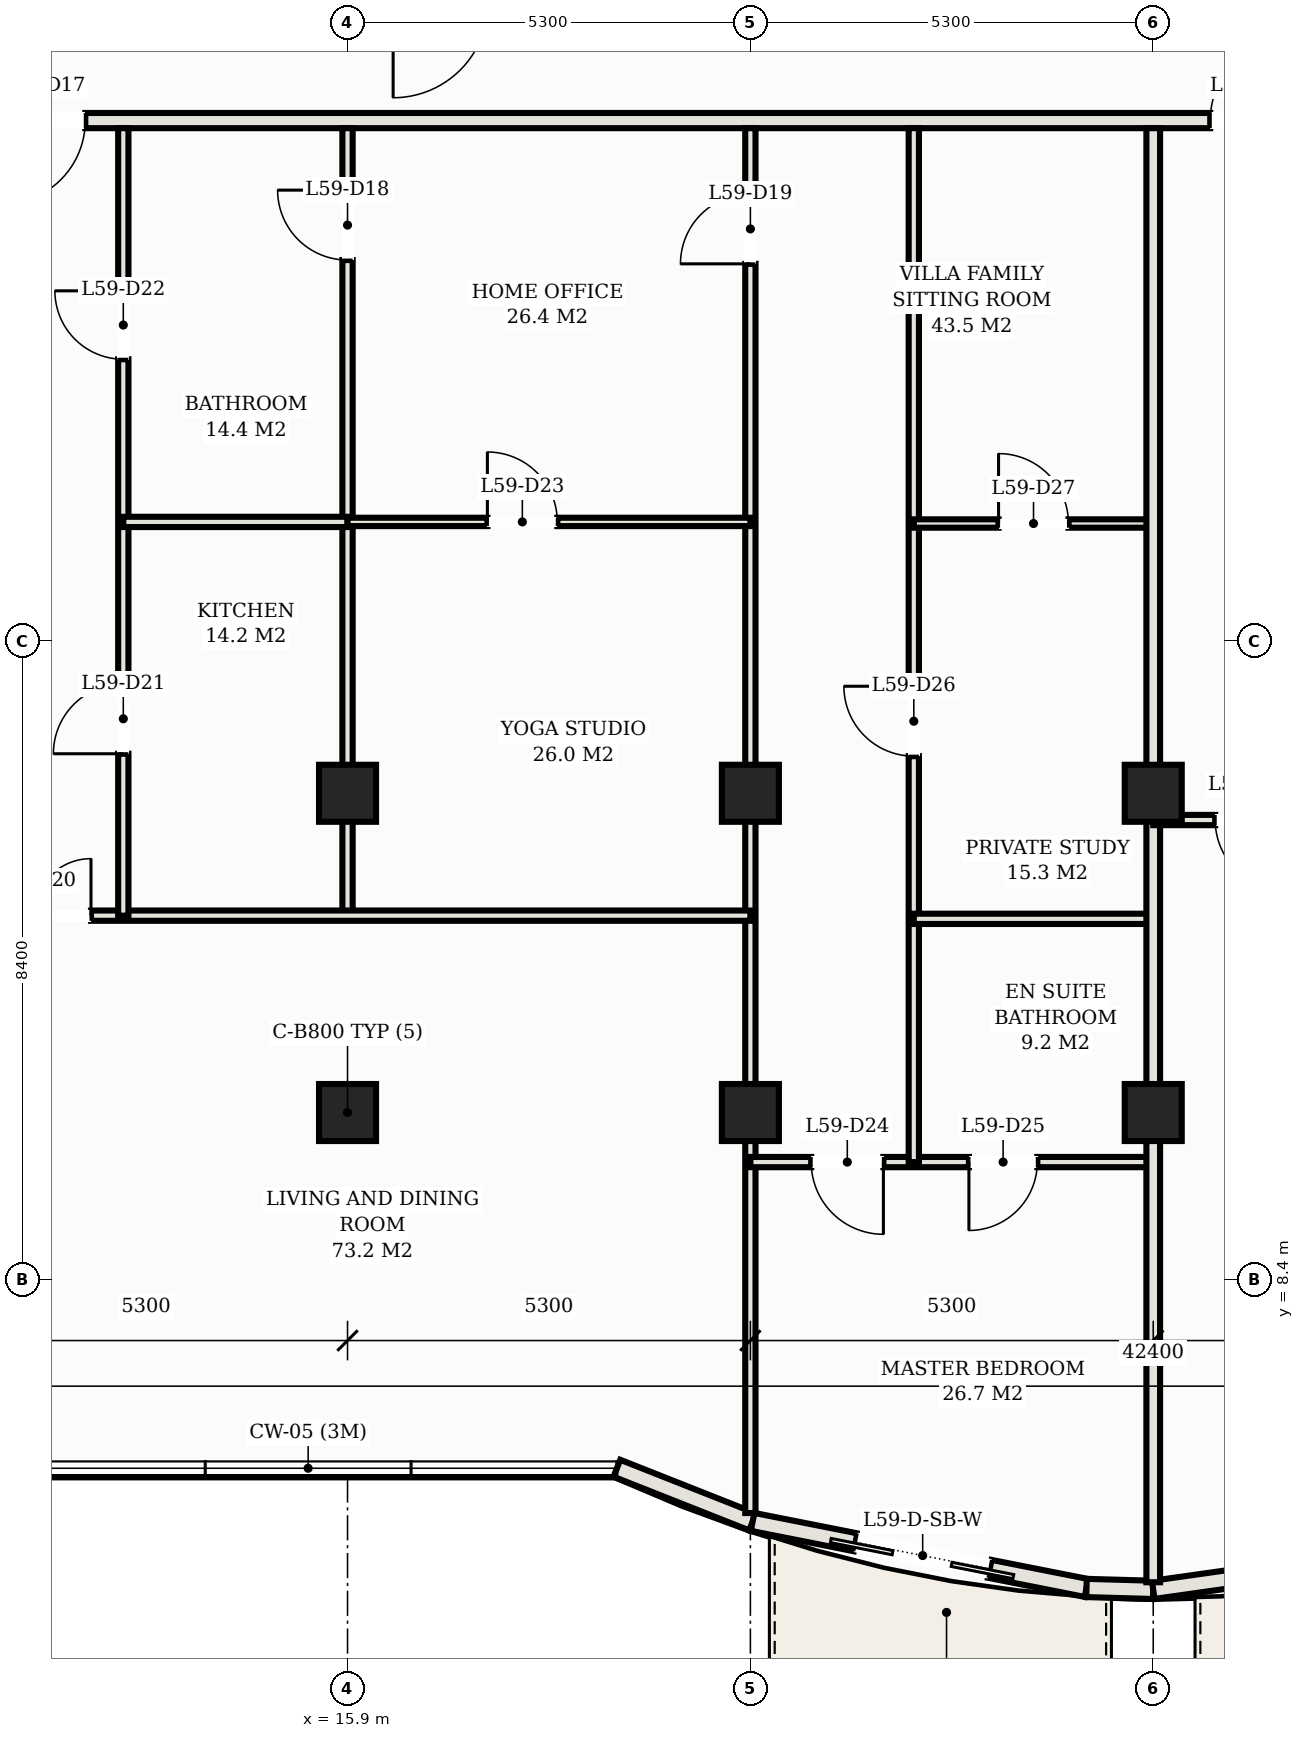
"""IFC4 building model, lengths in metres.
Left out: names, types, materials, properties, quantities, classifications, styles, units other than length and angle.
Written with IfcOpenShell. Run it as: python <this file> out.ifc"""

import sys

from ifc_helpers import new_model, si_unit, direction, frame, frame_2d, origin, origin_2d, place, context, subcontext, project, spatial, rectangle, hollow_rectangle, extrude, element, fill, save


model = new_model("IFC4")
c1 = context("Model", 3, precision=1e-05, world=origin(), true_north=direction((0.0, 1.0)))
c2 = subcontext(c1, "Body", "Model", "MODEL_VIEW")
j1 = project(units=[si_unit("LENGTHUNIT", "METRE"), si_unit("PLANEANGLEUNIT", "RADIAN")], contexts=[c1])
p1 = place(None, origin())
s1 = spatial("IfcSite", under=j1, at=p1, CompositionType="ELEMENT")
p2 = place(p1, origin())
s2 = spatial("IfcBuilding", under=s1, at=p2, CompositionType="ELEMENT")
p3 = place(p2, frame((0.0, 0.0, 216.5)))
s3 = spatial("IfcBuildingStorey", under=s2, at=p3, CompositionType="ELEMENT", Elevation=216.5)
for number, where, z_axis, x_axis in (
    (1, (15.9, 14.8, 0.0), (0.0, 0.0, 1.0), (1.0, 0.0, 0.0)),
    (2, (15.9, 10.6, 0.0), (0.0, 0.0, 1.0), (1.0, 0.0, 0.0)),
    (3, (21.2, 14.8, 0.0), (0.0, 0.0, 1.0), (1.0, 0.0, 0.0)),
    (4, (21.2, 10.6, 0.0), (0.0, 0.0, 1.0), (1.0, 0.0, 0.0)),
    (5, (26.5, 14.8, 0.0), (0.0, 0.0, 1.0), (1.0, 0.0, 0.0)),
    (6, (26.5, 10.6, 0.0), (0.0, 0.0, 1.0), (1.0, 0.0, 0.0)),
):
    element("IfcColumn", number, at=place(p3, frame(where, z_axis=z_axis, x_axis=x_axis)), inside=s3, PredefinedType="COLUMN", context=c2, shape_type="SweptSolid", body=[
        extrude(hollow_rectangle(XDim=0.75, YDim=0.75, WallThickness=0.025, at=origin_2d()), origin(), (0.0, 0.0, 1.0), 3.3),
    ])
p4 = place(p3, frame((19.444, 5.92, 0.0), z_axis=(0.0, 0.0, 1.0), x_axis=(0.92993442177, -0.367725401906, 0.0)))
e7 = element("IfcWall", 7, at=p4, inside=s3, PredefinedType="SOLIDWALL", context=c2, shape_type="SweptSolid", body=[
    extrude(rectangle(XDim=1.919, YDim=0.24, at=frame_2d((0.96, 0.0))), origin(), (0.0, 0.0, 1.0), 3.11),
])
p5 = place(p3, frame((21.229, 5.214, 0.0), z_axis=(0.0, 0.0, 1.0), x_axis=(0.980985349685, -0.194081796425, 0.0)))
e8 = element("IfcWall", 8, at=p5, inside=s3, PredefinedType="SOLIDWALL", context=c2, shape_type="SweptSolid", body=[
    extrude(rectangle(XDim=4.478, YDim=0.24, at=frame_2d((2.239, 0.0))), origin(), (0.0, 0.0, 1.0), 3.11),
])
p6 = place(p5, frame((1.381, 0.0, 0.0)))
e9 = element("IfcOpeningElement", 9, at=p6, cuts=e8, PredefinedType="OPENING", context=c2, shape_type="SweptSolid", body=[
    extrude(rectangle(XDim=1.8, YDim=2.2, at=frame_2d((0.9, 1.1))), frame((0.0, 0.13, 0.0), z_axis=(0.0, -1.0, 0.0), x_axis=(1.0, 0.0, 0.0)), (0.0, 0.0, 1.0), 0.26),
])
p7 = place(p3, frame((25.622, 4.345, 0.0), z_axis=(0.0, 0.0, 1.0), x_axis=(0.999597960231, -0.028353446035, 0.0)))
e10 = element("IfcWall", 10, at=p7, inside=s3, PredefinedType="SOLIDWALL", context=c2, shape_type="SweptSolid", body=[
    extrude(rectangle(XDim=0.878, YDim=0.24, at=frame_2d((0.439, 0.0))), origin(), (0.0, 0.0, 1.0), 3.11),
])
p8 = place(p3, frame((26.5, 4.32, 0.0), z_axis=(0.0, 0.0, 1.0), x_axis=(0.990156470874, 0.139964864115, 0.0)))
e11 = element("IfcWall", 11, at=p8, inside=s3, PredefinedType="SOLIDWALL", context=c2, shape_type="SweptSolid", body=[
    extrude(rectangle(XDim=4.436, YDim=0.24, at=frame_2d((2.218, 0.0))), origin(), (0.0, 0.0, 1.0), 3.11),
])
p9 = place(p8, frame((1.318, 0.0, 0.0)))
e12 = element("IfcOpeningElement", 12, at=p9, cuts=e11, PredefinedType="OPENING", context=c2, shape_type="SweptSolid", body=[
    extrude(rectangle(XDim=1.8, YDim=2.2, at=frame_2d((0.9, 1.1))), frame((0.0, 0.13, 0.0), z_axis=(0.0, -1.0, 0.0), x_axis=(1.0, 0.0, 0.0)), (0.0, 0.0, 1.0), 0.26),
])
p10 = place(p3, frame((6.72, 23.65, 0.0), z_axis=(0.0, 0.0, 1.0), x_axis=(1.0, 0.0, 0.0)))
e13 = element("IfcWall", 13, at=p10, inside=s3, PredefinedType="PARTITIONING", context=c2, shape_type="SweptSolid", body=[
    extrude(rectangle(XDim=39.56, YDim=0.2, at=frame_2d((19.78, 0.0))), origin(), (0.0, 0.0, 1.0), 2.43),
])
p11 = place(p10, frame((4.63, 0.0, 0.0)))
e14 = element("IfcOpeningElement", 14, at=p11, cuts=e13, PredefinedType="OPENING", context=c2, shape_type="SweptSolid", body=[
    extrude(rectangle(XDim=1.1, YDim=2.25, at=frame_2d((0.55, 1.125))), frame((0.0, 0.11, 0.0), z_axis=(0.0, -1.0, 0.0), x_axis=(1.0, 0.0, 0.0)), (0.0, 0.0, 1.0), 0.22),
])
p12 = place(p10, frame((20.53, 0.0, 0.0)))
e15 = element("IfcOpeningElement", 15, at=p12, cuts=e13, PredefinedType="OPENING", context=c2, shape_type="SweptSolid", body=[
    extrude(rectangle(XDim=1.1, YDim=2.25, at=frame_2d((0.55, 1.125))), frame((0.0, 0.11, 0.0), z_axis=(0.0, -1.0, 0.0), x_axis=(1.0, 0.0, 0.0)), (0.0, 0.0, 1.0), 0.22),
])
p13 = place(p10, frame((2.085, 0.0, 0.0)))
e16 = element("IfcOpeningElement", 16, at=p13, cuts=e13, PredefinedType="OPENING", context=c2, shape_type="SweptSolid", body=[
    extrude(rectangle(XDim=0.92, YDim=2.15, at=frame_2d((0.46, 1.075))), frame((0.0, 0.11, 0.0), z_axis=(0.0, -1.0, 0.0), x_axis=(1.0, 0.0, 0.0)), (0.0, 0.0, 1.0), 0.22),
])
p14 = place(p10, frame((36.555, 0.0, 0.0)))
e17 = element("IfcOpeningElement", 17, at=p14, cuts=e13, PredefinedType="OPENING", context=c2, shape_type="SweptSolid", body=[
    extrude(rectangle(XDim=0.92, YDim=2.15, at=frame_2d((0.46, 1.075))), frame((0.0, 0.11, 0.0), z_axis=(0.0, -1.0, 0.0), x_axis=(1.0, 0.0, 0.0)), (0.0, 0.0, 1.0), 0.22),
])
p15 = place(p3, frame((15.9, 14.8, 0.0), z_axis=(0.0, 0.0, 1.0), x_axis=(0.0, 1.0, 0.0)))
e18 = element("IfcWall", 18, at=p15, inside=s3, PredefinedType="PARTITIONING", context=c2, shape_type="SweptSolid", body=[
    extrude(rectangle(XDim=8.75, YDim=0.135, at=frame_2d((4.375, 0.0))), origin(), (0.0, 0.0, 1.0), 2.43),
])
p16 = place(p15, frame((7.015, 0.0, 0.0)))
e19 = element("IfcOpeningElement", 19, at=p16, cuts=e18, PredefinedType="OPENING", context=c2, shape_type="SweptSolid", body=[
    extrude(rectangle(XDim=0.92, YDim=2.15, at=frame_2d((0.46, 1.075))), frame((0.0, 0.078, 0.0), z_axis=(0.0, -1.0, 0.0), x_axis=(1.0, 0.0, 0.0)), (0.0, 0.0, 1.0), 0.155),
])
p17 = place(p3, frame((21.2, 5.331, 0.0), z_axis=(0.0, 0.0, 1.0), x_axis=(0.0, 1.0, 0.0)))
e20 = element("IfcWall", 20, at=p17, inside=s3, PredefinedType="PARTITIONING", context=c2, shape_type="SweptSolid", body=[
    extrude(rectangle(XDim=18.219, YDim=0.135, at=frame_2d((9.109, 0.0))), origin(), (0.0, 0.0, 1.0), 2.43),
])
p18 = place(p17, frame((16.434, 0.0, 0.0)))
e21 = element("IfcOpeningElement", 21, at=p18, cuts=e20, PredefinedType="OPENING", context=c2, shape_type="SweptSolid", body=[
    extrude(rectangle(XDim=0.92, YDim=2.15, at=frame_2d((0.46, 1.075))), frame((0.0, 0.078, 0.0), z_axis=(0.0, -1.0, 0.0), x_axis=(1.0, 0.0, 0.0)), (0.0, 0.0, 1.0), 0.155),
])
p19 = place(p3, frame((15.9, 13.19, 0.0), z_axis=(0.0, 0.0, 1.0), x_axis=(0.0, 1.0, 0.0)))
e22 = element("IfcWall", 22, at=p19, inside=s3, PredefinedType="PARTITIONING", context=c2, shape_type="SweptSolid", body=[
    extrude(rectangle(XDim=1.61, YDim=0.135, at=frame_2d((0.805, 0.0))), origin(), (0.0, 0.0, 1.0), 2.43),
])
p20 = place(p3, frame((10.6, 13.19, 0.0), z_axis=(0.0, 0.0, 1.0), x_axis=(1.0, 0.0, 0.0)))
e23 = element("IfcWall", 23, at=p20, inside=s3, PredefinedType="PARTITIONING", context=c2, shape_type="SweptSolid", body=[
    extrude(rectangle(XDim=10.6, YDim=0.135, at=frame_2d((5.3, 0.0))), origin(), (0.0, 0.0, 1.0), 2.43),
])
p21 = place(p20, frame((0.425, 0.0, 0.0)))
e24 = element("IfcOpeningElement", 24, at=p21, cuts=e23, PredefinedType="OPENING", context=c2, shape_type="SweptSolid", body=[
    extrude(rectangle(XDim=1.5, YDim=2.25, at=frame_2d((0.75, 1.125))), frame((0.0, 0.078, 0.0), z_axis=(0.0, -1.0, 0.0), x_axis=(1.0, 0.0, 0.0)), (0.0, 0.0, 1.0), 0.155),
])
p22 = place(p3, frame((12.95, 13.19, 0.0), z_axis=(0.0, 0.0, 1.0), x_axis=(0.0, 1.0, 0.0)))
e25 = element("IfcWall", 25, at=p22, inside=s3, PredefinedType="PARTITIONING", context=c2, shape_type="SweptSolid", body=[
    extrude(rectangle(XDim=10.36, YDim=0.135, at=frame_2d((5.18, 0.0))), origin(), (0.0, 0.0, 1.0), 2.43),
])
p23 = place(p22, frame((2.13, 0.0, 0.0)))
e26 = element("IfcOpeningElement", 26, at=p23, cuts=e25, PredefinedType="OPENING", context=c2, shape_type="SweptSolid", body=[
    extrude(rectangle(XDim=0.92, YDim=2.15, at=frame_2d((0.46, 1.075))), frame((0.0, 0.078, 0.0), z_axis=(0.0, -1.0, 0.0), x_axis=(1.0, 0.0, 0.0)), (0.0, 0.0, 1.0), 0.155),
])
p24 = place(p22, frame((7.32, 0.0, 0.0)))
e27 = element("IfcOpeningElement", 27, at=p24, cuts=e25, PredefinedType="OPENING", context=c2, shape_type="SweptSolid", body=[
    extrude(rectangle(XDim=0.9, YDim=2.15, at=frame_2d((0.45, 1.075))), frame((0.0, 0.078, 0.0), z_axis=(0.0, -1.0, 0.0), x_axis=(1.0, 0.0, 0.0)), (0.0, 0.0, 1.0), 0.155),
])
p25 = place(p3, frame((12.95, 18.37, 0.0), z_axis=(0.0, 0.0, 1.0), x_axis=(1.0, 0.0, 0.0)))
e28 = element("IfcWall", 28, at=p25, inside=s3, PredefinedType="PARTITIONING", context=c2, shape_type="SweptSolid", body=[
    extrude(rectangle(XDim=2.95, YDim=0.135, at=frame_2d((1.475, 0.0))), origin(), (0.0, 0.0, 1.0), 2.43),
])
p26 = place(p3, frame((15.9, 18.37, 0.0), z_axis=(0.0, 0.0, 1.0), x_axis=(1.0, 0.0, 0.0)))
e29 = element("IfcWall", 29, at=p26, inside=s3, PredefinedType="MOVABLE", context=c2, shape_type="SweptSolid", body=[
    extrude(rectangle(XDim=5.3, YDim=0.11, at=frame_2d((2.65, 0.0))), origin(), (0.0, 0.0, 1.0), 2.43),
])
p27 = place(p26, frame((1.84, 0.0, 0.0)))
e30 = element("IfcOpeningElement", 30, at=p27, cuts=e29, PredefinedType="OPENING", context=c2, shape_type="SweptSolid", body=[
    extrude(rectangle(XDim=0.92, YDim=2.15, at=frame_2d((0.46, 1.075))), frame((0.0, 0.065, 0.0), z_axis=(0.0, -1.0, 0.0), x_axis=(1.0, 0.0, 0.0)), (0.0, 0.0, 1.0), 0.13),
])
p28 = place(p3, frame((21.2, 9.948, 0.0), z_axis=(0.0, 0.0, 1.0), x_axis=(1.0, 0.0, 0.0)))
e31 = element("IfcWall", 31, at=p28, inside=s3, PredefinedType="PARTITIONING", context=c2, shape_type="SweptSolid", body=[
    extrude(rectangle(XDim=5.3, YDim=0.135, at=frame_2d((2.65, 0.0))), origin(), (0.0, 0.0, 1.0), 2.43),
])
p29 = place(p28, frame((0.8, 0.0, 0.0)))
e32 = element("IfcOpeningElement", 32, at=p29, cuts=e31, PredefinedType="OPENING", context=c2, shape_type="SweptSolid", body=[
    extrude(rectangle(XDim=0.95, YDim=2.15, at=frame_2d((0.475, 1.075))), frame((0.0, 0.078, 0.0), z_axis=(0.0, -1.0, 0.0), x_axis=(1.0, 0.0, 0.0)), (0.0, 0.0, 1.0), 0.155),
])
p30 = place(p28, frame((2.875, 0.0, 0.0)))
e33 = element("IfcOpeningElement", 33, at=p30, cuts=e31, PredefinedType="OPENING", context=c2, shape_type="SweptSolid", body=[
    extrude(rectangle(XDim=0.9, YDim=2.15, at=frame_2d((0.45, 1.075))), frame((0.0, 0.078, 0.0), z_axis=(0.0, -1.0, 0.0), x_axis=(1.0, 0.0, 0.0)), (0.0, 0.0, 1.0), 0.155),
])
p31 = place(p3, frame((23.35, 9.948, 0.0), z_axis=(0.0, 0.0, 1.0), x_axis=(0.0, 1.0, 0.0)))
e34 = element("IfcWall", 34, at=p31, inside=s3, PredefinedType="PARTITIONING", context=c2, shape_type="SweptSolid", body=[
    extrude(rectangle(XDim=13.602, YDim=0.135, at=frame_2d((6.801, 0.0))), origin(), (0.0, 0.0, 1.0), 2.43),
])
p32 = place(p31, frame((5.34, 0.0, 0.0)))
e35 = element("IfcOpeningElement", 35, at=p32, cuts=e34, PredefinedType="OPENING", context=c2, shape_type="SweptSolid", body=[
    extrude(rectangle(XDim=0.92, YDim=2.15, at=frame_2d((0.46, 1.075))), frame((0.0, 0.078, 0.0), z_axis=(0.0, -1.0, 0.0), x_axis=(1.0, 0.0, 0.0)), (0.0, 0.0, 1.0), 0.155),
])
p33 = place(p3, frame((23.35, 13.148, 0.0), z_axis=(0.0, 0.0, 1.0), x_axis=(1.0, 0.0, 0.0)))
e36 = element("IfcWall", 36, at=p33, inside=s3, PredefinedType="PARTITIONING", context=c2, shape_type="SweptSolid", body=[
    extrude(rectangle(XDim=3.15, YDim=0.135, at=frame_2d((1.575, 0.0))), origin(), (0.0, 0.0, 1.0), 2.43),
])
p34 = place(p3, frame((23.35, 18.349, 0.0), z_axis=(0.0, 0.0, 1.0), x_axis=(1.0, 0.0, 0.0)))
e37 = element("IfcWall", 37, at=p34, inside=s3, PredefinedType="MOVABLE", context=c2, shape_type="SweptSolid", body=[
    extrude(rectangle(XDim=3.15, YDim=0.11, at=frame_2d((1.575, 0.0))), origin(), (0.0, 0.0, 1.0), 2.43),
])
p35 = place(p34, frame((1.115, 0.0, 0.0)))
e38 = element("IfcOpeningElement", 38, at=p35, cuts=e37, PredefinedType="OPENING", context=c2, shape_type="SweptSolid", body=[
    extrude(rectangle(XDim=0.92, YDim=2.15, at=frame_2d((0.46, 1.075))), frame((0.0, 0.065, 0.0), z_axis=(0.0, -1.0, 0.0), x_axis=(1.0, 0.0, 0.0)), (0.0, 0.0, 1.0), 0.13),
])
p36 = place(p3, frame((26.5, 4.42, 0.0), z_axis=(0.0, 0.0, 1.0), x_axis=(0.0, 1.0, 0.0)))
e39 = element("IfcWall", 39, at=p36, inside=s3, PredefinedType="PARTITIONING", context=c2, shape_type="SweptSolid", body=[
    extrude(rectangle(XDim=19.13, YDim=0.18, at=frame_2d((9.565, 0.0))), origin(), (0.0, 0.0, 1.0), 2.43),
])
p37 = place(p3, frame((26.5, 14.448, 0.0), z_axis=(0.0, 0.0, 1.0), x_axis=(1.0, 0.0, 0.0)))
e40 = element("IfcWall", 40, at=p37, inside=s3, PredefinedType="PARTITIONING", context=c2, shape_type="SweptSolid", body=[
    extrude(rectangle(XDim=5.3, YDim=0.135, at=frame_2d((2.65, 0.0))), origin(), (0.0, 0.0, 1.0), 2.43),
])
p38 = place(p37, frame((0.815, 0.0, 0.0)))
e41 = element("IfcOpeningElement", 41, at=p38, cuts=e40, PredefinedType="OPENING", context=c2, shape_type="SweptSolid", body=[
    extrude(rectangle(XDim=0.92, YDim=2.15, at=frame_2d((0.46, 1.075))), frame((0.0, 0.078, 0.0), z_axis=(0.0, -1.0, 0.0), x_axis=(1.0, 0.0, 0.0)), (0.0, 0.0, 1.0), 0.155),
])
p39 = place(p6, frame((1.8, 0.0, 0.0), z_axis=(0.0, 0.0, 1.0), x_axis=(-1.0, 0.0, 0.0)))
e42 = element("IfcDoor", 42, at=p39, inside=s3, OperationType="DOUBLE_DOOR_SLIDING", PredefinedType="DOOR", context=c2, shape_type="SweptSolid", body=[
    extrude(rectangle(XDim=1.8, YDim=2.2, at=frame_2d((0.9, 1.1))), frame((0.0, 0.025, 0.0), z_axis=(0.0, -1.0, 0.0), x_axis=(1.0, 0.0, 0.0)), (0.0, 0.0, 1.0), 0.05),
])
fill(e9, e42)
p40 = place(p11, frame((1.1, 0.0, 0.0), z_axis=(0.0, 0.0, 1.0), x_axis=(-1.0, 0.0, 0.0)))
e43 = element("IfcDoor", 43, at=p40, inside=s3, OperationType="SINGLE_SWING_RIGHT", PredefinedType="DOOR", context=c2, shape_type="SweptSolid", body=[
    extrude(rectangle(XDim=1.1, YDim=2.25, at=frame_2d((0.55, 1.125))), frame((0.0, 0.025, 0.0), z_axis=(0.0, -1.0, 0.0), x_axis=(1.0, 0.0, 0.0)), (0.0, 0.0, 1.0), 0.05),
])
fill(e14, e43)
p41 = place(p16, origin())
e44 = element("IfcDoor", 44, at=p41, inside=s3, OperationType="SINGLE_SWING_RIGHT", PredefinedType="DOOR", context=c2, shape_type="SweptSolid", body=[
    extrude(rectangle(XDim=0.92, YDim=2.15, at=frame_2d((0.46, 1.075))), frame((0.0, 0.025, 0.0), z_axis=(0.0, -1.0, 0.0), x_axis=(1.0, 0.0, 0.0)), (0.0, 0.0, 1.0), 0.05),
])
fill(e19, e44)
p42 = place(p18, origin())
e45 = element("IfcDoor", 45, at=p42, inside=s3, OperationType="SINGLE_SWING_LEFT", PredefinedType="DOOR", context=c2, shape_type="SweptSolid", body=[
    extrude(rectangle(XDim=0.92, YDim=2.15, at=frame_2d((0.46, 1.075))), frame((0.0, 0.025, 0.0), z_axis=(0.0, -1.0, 0.0), x_axis=(1.0, 0.0, 0.0)), (0.0, 0.0, 1.0), 0.05),
])
fill(e21, e45)
p43 = place(p21, origin())
e46 = element("IfcDoor", 46, at=p43, inside=s3, OperationType="DOUBLE_DOOR_SINGLE_SWING", PredefinedType="DOOR", context=c2, shape_type="SweptSolid", body=[
    extrude(rectangle(XDim=1.5, YDim=2.25, at=frame_2d((0.75, 1.125))), frame((0.0, 0.025, 0.0), z_axis=(0.0, -1.0, 0.0), x_axis=(1.0, 0.0, 0.0)), (0.0, 0.0, 1.0), 0.05),
])
fill(e24, e46)
p44 = place(p23, origin())
e47 = element("IfcDoor", 47, at=p44, inside=s3, OperationType="SINGLE_SWING_LEFT", PredefinedType="DOOR", context=c2, shape_type="SweptSolid", body=[
    extrude(rectangle(XDim=0.92, YDim=2.15, at=frame_2d((0.46, 1.075))), frame((0.0, 0.025, 0.0), z_axis=(0.0, -1.0, 0.0), x_axis=(1.0, 0.0, 0.0)), (0.0, 0.0, 1.0), 0.05),
])
fill(e26, e47)
p45 = place(p24, origin())
e48 = element("IfcDoor", 48, at=p45, inside=s3, OperationType="SINGLE_SWING_RIGHT", PredefinedType="DOOR", context=c2, shape_type="SweptSolid", body=[
    extrude(rectangle(XDim=0.9, YDim=2.15, at=frame_2d((0.45, 1.075))), frame((0.0, 0.025, 0.0), z_axis=(0.0, -1.0, 0.0), x_axis=(1.0, 0.0, 0.0)), (0.0, 0.0, 1.0), 0.05),
])
fill(e27, e48)
p46 = place(p27, origin())
e49 = element("IfcDoor", 49, at=p46, inside=s3, OperationType="SINGLE_SWING_LEFT", PredefinedType="DOOR", context=c2, shape_type="SweptSolid", body=[
    extrude(rectangle(XDim=0.92, YDim=2.15, at=frame_2d((0.46, 1.075))), frame((0.0, 0.025, 0.0), z_axis=(0.0, -1.0, 0.0), x_axis=(1.0, 0.0, 0.0)), (0.0, 0.0, 1.0), 0.05),
])
fill(e30, e49)
p47 = place(p29, frame((0.95, 0.0, 0.0), z_axis=(0.0, 0.0, 1.0), x_axis=(-1.0, 0.0, 0.0)))
e50 = element("IfcDoor", 50, at=p47, inside=s3, OperationType="SINGLE_SWING_LEFT", PredefinedType="DOOR", context=c2, shape_type="SweptSolid", body=[
    extrude(rectangle(XDim=0.95, YDim=2.15, at=frame_2d((0.475, 1.075))), frame((0.0, 0.025, 0.0), z_axis=(0.0, -1.0, 0.0), x_axis=(1.0, 0.0, 0.0)), (0.0, 0.0, 1.0), 0.05),
])
fill(e32, e50)
p48 = place(p30, frame((0.9, 0.0, 0.0), z_axis=(0.0, 0.0, 1.0), x_axis=(-1.0, 0.0, 0.0)))
e51 = element("IfcDoor", 51, at=p48, inside=s3, OperationType="SINGLE_SWING_RIGHT", PredefinedType="DOOR", context=c2, shape_type="SweptSolid", body=[
    extrude(rectangle(XDim=0.9, YDim=2.15, at=frame_2d((0.45, 1.075))), frame((0.0, 0.025, 0.0), z_axis=(0.0, -1.0, 0.0), x_axis=(1.0, 0.0, 0.0)), (0.0, 0.0, 1.0), 0.05),
])
fill(e33, e51)
p49 = place(p32, origin())
e52 = element("IfcDoor", 52, at=p49, inside=s3, OperationType="SINGLE_SWING_RIGHT", PredefinedType="DOOR", context=c2, shape_type="SweptSolid", body=[
    extrude(rectangle(XDim=0.92, YDim=2.15, at=frame_2d((0.46, 1.075))), frame((0.0, 0.025, 0.0), z_axis=(0.0, -1.0, 0.0), x_axis=(1.0, 0.0, 0.0)), (0.0, 0.0, 1.0), 0.05),
])
fill(e35, e52)
p50 = place(p35, origin())
e53 = element("IfcDoor", 53, at=p50, inside=s3, OperationType="SINGLE_SWING_LEFT", PredefinedType="DOOR", context=c2, shape_type="SweptSolid", body=[
    extrude(rectangle(XDim=0.92, YDim=2.15, at=frame_2d((0.46, 1.075))), frame((0.0, 0.025, 0.0), z_axis=(0.0, -1.0, 0.0), x_axis=(1.0, 0.0, 0.0)), (0.0, 0.0, 1.0), 0.05),
])
fill(e38, e53)
p51 = place(p12, origin())
e54 = element("IfcDoor", 54, at=p51, inside=s3, OperationType="SINGLE_SWING_RIGHT", PredefinedType="DOOR", context=c2, shape_type="SweptSolid", body=[
    extrude(rectangle(XDim=1.1, YDim=2.25, at=frame_2d((0.55, 1.125))), frame((0.0, 0.025, 0.0), z_axis=(0.0, -1.0, 0.0), x_axis=(1.0, 0.0, 0.0)), (0.0, 0.0, 1.0), 0.05),
])
fill(e15, e54)
p52 = place(p38, frame((0.92, 0.0, 0.0), z_axis=(0.0, 0.0, 1.0), x_axis=(-1.0, 0.0, 0.0)))
e55 = element("IfcDoor", 55, at=p52, inside=s3, OperationType="SINGLE_SWING_LEFT", PredefinedType="DOOR", context=c2, shape_type="SweptSolid", body=[
    extrude(rectangle(XDim=0.92, YDim=2.15, at=frame_2d((0.46, 1.075))), frame((0.0, 0.025, 0.0), z_axis=(0.0, -1.0, 0.0), x_axis=(1.0, 0.0, 0.0)), (0.0, 0.0, 1.0), 0.05),
])
fill(e41, e55)
save(model, sys.argv[1])
